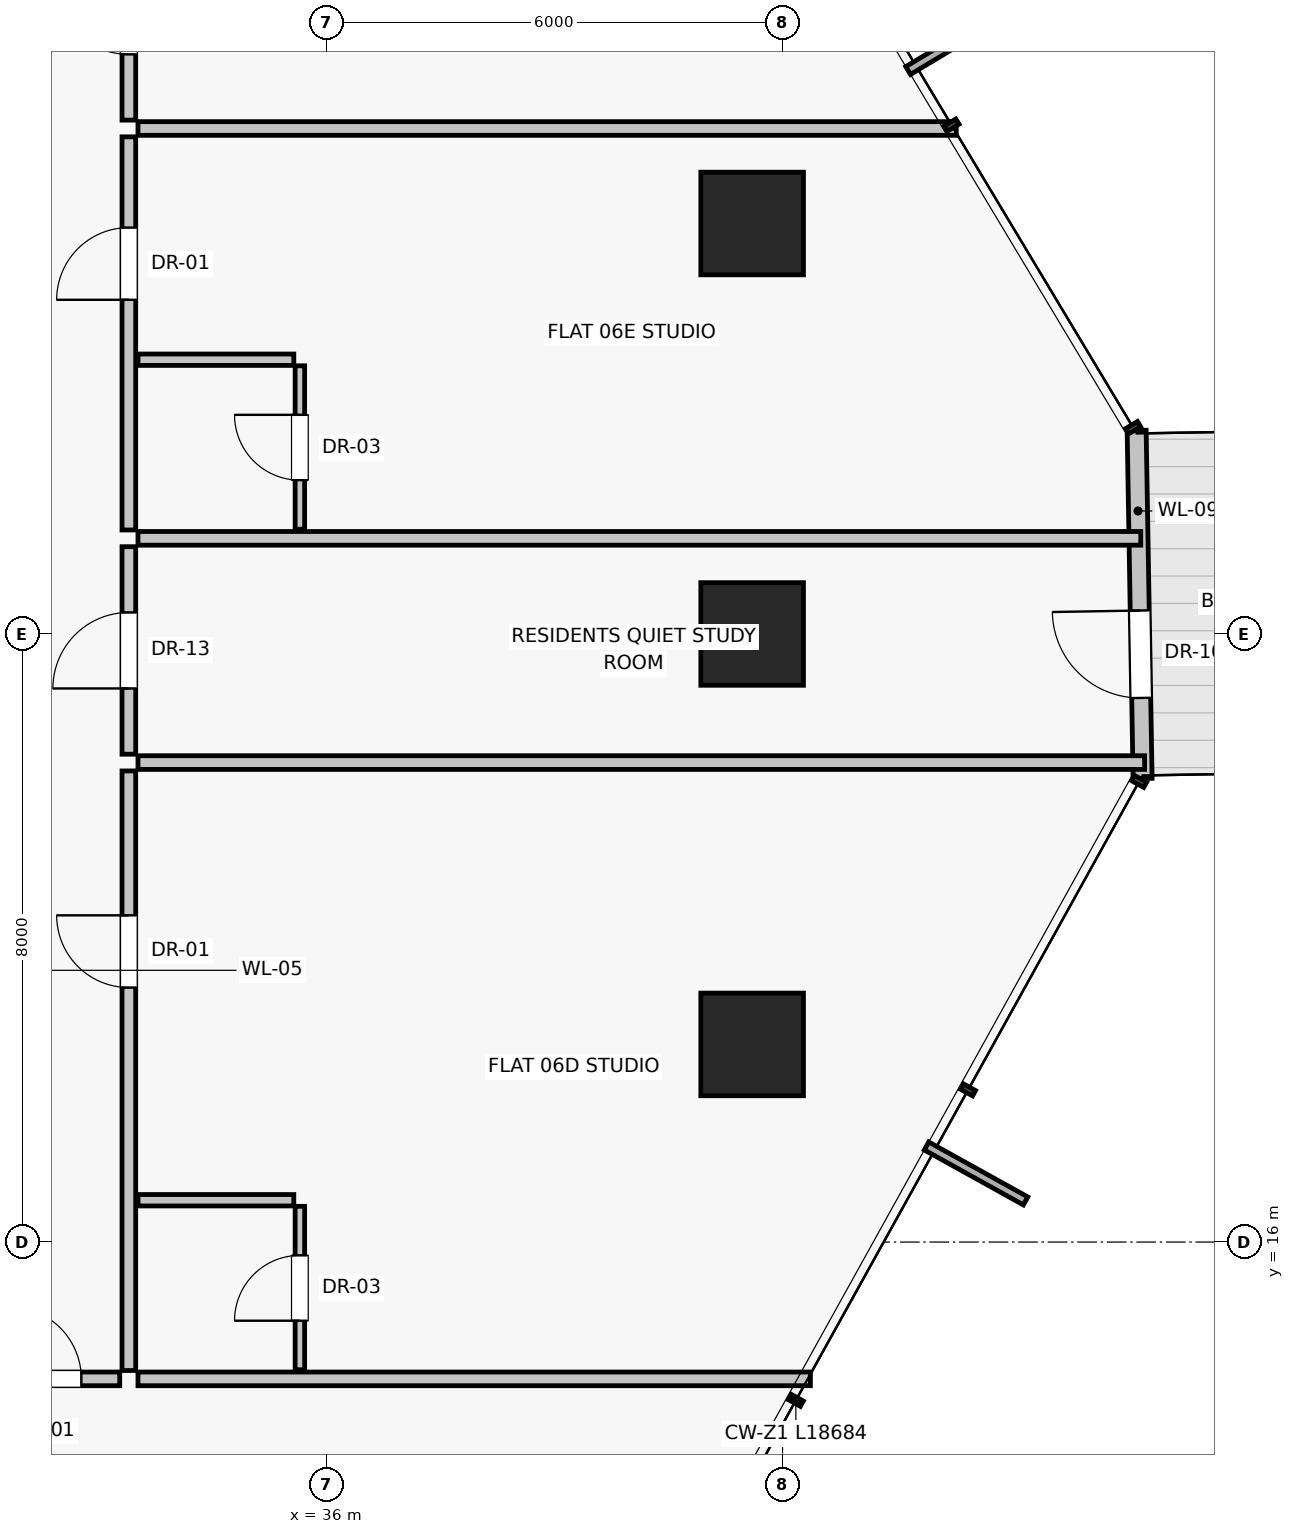
"""IFC4 building model, lengths in metres.
Left out: names, types, materials, properties, quantities, classifications, styles, units other than length and angle.
Written with IfcOpenShell. Run it as: python <this file> out.ifc"""

import sys

from ifc_helpers import new_model, si_unit, direction, frame, frame_2d, origin, origin_2d, place, context, subcontext, project, spatial, rectangle, extrude, source, transform, mapped, element, fill, save


model = new_model("IFC4")
c1 = context("Model", 3, precision=1e-05, world=origin(), true_north=direction((0.0, 1.0)))
c2 = subcontext(c1, "Body", "Model", "MODEL_VIEW")
j1 = project(units=[si_unit("LENGTHUNIT", "METRE"), si_unit("PLANEANGLEUNIT", "RADIAN")], contexts=[c1])
p1 = place(None, origin())
s1 = spatial("IfcSite", under=j1, at=p1, CompositionType="ELEMENT")
p2 = place(p1, origin())
s2 = spatial("IfcBuilding", under=s1, at=p2, CompositionType="ELEMENT")
p3 = place(p2, frame((0.0, 0.0, 27.3)))
s3 = spatial("IfcBuildingStorey", under=s2, at=p3, CompositionType="ELEMENT", Elevation=27.3)
for number, where, z_axis, x_axis in (
    (1, (41.6, 18.6, 0.0), (0.0, 0.0, 1.0), (1.0, 0.0, 0.0)),
    (2, (41.6, 24.0, 0.0), (0.0, 0.0, 1.0), (1.0, 0.0, 0.0)),
    (3, (41.6, 29.4, 0.0), (0.0, 0.0, 1.0), (1.0, 0.0, 0.0)),
):
    element("IfcColumn", number, at=place(p3, frame(where, z_axis=z_axis, x_axis=x_axis)), inside=s3, PredefinedType="COLUMN", context=c2, shape_type="SweptSolid", body=[
        extrude(rectangle(XDim=1.35, YDim=1.35, at=origin_2d()), origin(), (0.0, 0.0, 1.0), 3.25),
    ])
p4 = place(p3, frame((46.737, 22.099, 0.0), z_axis=(0.0, 0.0, 1.0), x_axis=(-0.017111105389, 0.999853594319, 0.0)))
e4 = element("IfcWall", 4, at=p4, inside=s3, PredefinedType="SOLIDWALL", context=c2, shape_type="SweptSolid", body=[
    extrude(rectangle(XDim=4.58, YDim=0.25, at=frame_2d((2.29, 0.0))), origin(), (0.0, 0.0, 1.0), 3.0),
])
p5 = place(p4, frame((1.06, 0.0, 0.0)))
e5 = element("IfcOpeningElement", 5, at=p5, cuts=e4, PredefinedType="OPENING", context=c2, shape_type="SweptSolid", body=[
    extrude(rectangle(XDim=1.15, YDim=2.25, at=frame_2d((0.575, 1.125))), frame((0.0, 0.135, 0.0), z_axis=(0.0, -1.0, 0.0), x_axis=(1.0, 0.0, 0.0)), (0.0, 0.0, 1.0), 0.27),
])
p6 = place(p3, frame((33.52, 14.2, 0.0), z_axis=(0.0, 0.0, 1.0), x_axis=(1.0, 0.0, 0.0)))
e6 = element("IfcWall", 6, at=p6, inside=s3, PredefinedType="PARTITIONING", context=c2, shape_type="SweptSolid", body=[
    extrude(rectangle(XDim=8.846, YDim=0.18, at=frame_2d((4.423, 0.0))), origin(), (0.0, 0.0, 1.0), 3.0),
])
p7 = place(p3, frame((33.4, 22.418, 0.0), z_axis=(0.0, 0.0, 1.0), x_axis=(0.0, 1.0, 0.0)))
e7 = element("IfcWall", 7, at=p7, inside=s3, PredefinedType="PARTITIONING", context=c2, shape_type="SweptSolid", body=[
    extrude(rectangle(XDim=2.73, YDim=0.18, at=frame_2d((1.365, 0.0))), origin(), (0.0, 0.0, 1.0), 3.0),
])
p8 = place(p7, frame((0.865, 0.0, 0.0)))
e8 = element("IfcOpeningElement", 8, at=p8, cuts=e7, PredefinedType="OPENING", context=c2, shape_type="SweptSolid", body=[
    extrude(rectangle(XDim=1.0, YDim=2.01, at=frame_2d((0.5, 1.005))), frame((0.0, 0.1, 0.0), z_axis=(0.0, -1.0, 0.0), x_axis=(1.0, 0.0, 0.0)), (0.0, 0.0, 1.0), 0.2),
])
p9 = place(p3, frame((33.52, 22.308, 0.0), z_axis=(0.0, 0.0, 1.0), x_axis=(1.0, 0.0, 0.0)))
e9 = element("IfcWall", 9, at=p9, inside=s3, PredefinedType="PARTITIONING", context=c2, shape_type="SweptSolid", body=[
    extrude(rectangle(XDim=13.243, YDim=0.18, at=frame_2d((6.622, 0.0))), origin(), (0.0, 0.0, 1.0), 3.0),
])
p10 = place(p3, frame((33.4, 14.31, 0.0), z_axis=(0.0, 0.0, 1.0), x_axis=(0.0, 1.0, 0.0)))
e10 = element("IfcWall", 10, at=p10, inside=s3, PredefinedType="PARTITIONING", context=c2, shape_type="SweptSolid", body=[
    extrude(rectangle(XDim=7.888, YDim=0.18, at=frame_2d((3.944, 0.0))), origin(), (0.0, 0.0, 1.0), 3.0),
])
p11 = place(p10, frame((5.038, 0.0, 0.0)))
e11 = element("IfcOpeningElement", 11, at=p11, cuts=e10, PredefinedType="OPENING", context=c2, shape_type="SweptSolid", body=[
    extrude(rectangle(XDim=0.95, YDim=2.02, at=frame_2d((0.475, 1.01))), frame((0.0, 0.1, 0.0), z_axis=(0.0, -1.0, 0.0), x_axis=(1.0, 0.0, 0.0)), (0.0, 0.0, 1.0), 0.2),
])
p12 = place(p3, frame((33.52, 16.55, 0.0), z_axis=(0.0, 0.0, 1.0), x_axis=(1.0, 0.0, 0.0)))
e12 = element("IfcWall", 12, at=p12, inside=s3, PredefinedType="PARTITIONING", context=c2, shape_type="SweptSolid", body=[
    extrude(rectangle(XDim=2.05, YDim=0.15, at=frame_2d((1.025, 0.0))), origin(), (0.0, 0.0, 1.0), 3.0),
])
p13 = place(p3, frame((35.65, 14.32, 0.0), z_axis=(0.0, 0.0, 1.0), x_axis=(0.0, 1.0, 0.0)))
e13 = element("IfcWall", 13, at=p13, inside=s3, PredefinedType="PARTITIONING", context=c2, shape_type="SweptSolid", body=[
    extrude(rectangle(XDim=2.15, YDim=0.125, at=frame_2d((1.075, 0.0))), origin(), (0.0, 0.0, 1.0), 3.0),
])
p14 = place(p13, frame((0.645, 0.0, 0.0)))
e14 = element("IfcOpeningElement", 14, at=p14, cuts=e13, PredefinedType="OPENING", context=c2, shape_type="SweptSolid", body=[
    extrude(rectangle(XDim=0.86, YDim=2.01, at=frame_2d((0.43, 1.005))), frame((0.0, 0.073, 0.0), z_axis=(0.0, -1.0, 0.0), x_axis=(1.0, 0.0, 0.0)), (0.0, 0.0, 1.0), 0.145),
])
p15 = place(p3, frame((33.52, 25.258, 0.0), z_axis=(0.0, 0.0, 1.0), x_axis=(1.0, 0.0, 0.0)))
e15 = element("IfcWall", 15, at=p15, inside=s3, PredefinedType="PARTITIONING", context=c2, shape_type="SweptSolid", body=[
    extrude(rectangle(XDim=13.193, YDim=0.18, at=frame_2d((6.596, 0.0))), origin(), (0.0, 0.0, 1.0), 3.0),
])
p16 = place(p3, frame((33.4, 30.76, 0.0), z_axis=(0.0, 0.0, 1.0), x_axis=(0.0, 1.0, 0.0)))
e16 = element("IfcWall", 16, at=p16, inside=s3, PredefinedType="PARTITIONING", context=c2, shape_type="SweptSolid", body=[
    extrude(rectangle(XDim=2.73, YDim=0.18, at=frame_2d((1.365, 0.0))), origin(), (0.0, 0.0, 1.0), 3.0),
])
p17 = place(p16, frame((0.865, 0.0, 0.0)))
e17 = element("IfcOpeningElement", 17, at=p17, cuts=e16, PredefinedType="OPENING", context=c2, shape_type="SweptSolid", body=[
    extrude(rectangle(XDim=1.0, YDim=2.01, at=frame_2d((0.5, 1.005))), frame((0.0, 0.1, 0.0), z_axis=(0.0, -1.0, 0.0), x_axis=(1.0, 0.0, 0.0)), (0.0, 0.0, 1.0), 0.2),
])
p18 = place(p3, frame((33.52, 30.65, 0.0), z_axis=(0.0, 0.0, 1.0), x_axis=(1.0, 0.0, 0.0)))
e18 = element("IfcWall", 18, at=p18, inside=s3, PredefinedType="PARTITIONING", context=c2, shape_type="SweptSolid", body=[
    extrude(rectangle(XDim=10.765, YDim=0.18, at=frame_2d((5.383, 0.0))), origin(), (0.0, 0.0, 1.0), 2.299),
])
p19 = place(p3, frame((33.4, 25.368, 0.0), z_axis=(0.0, 0.0, 1.0), x_axis=(0.0, 1.0, 0.0)))
e19 = element("IfcWall", 19, at=p19, inside=s3, PredefinedType="PARTITIONING", context=c2, shape_type="SweptSolid", body=[
    extrude(rectangle(XDim=5.172, YDim=0.18, at=frame_2d((2.586, 0.0))), origin(), (0.0, 0.0, 1.0), 3.0),
])
p20 = place(p19, frame((3.028, 0.0, 0.0)))
e20 = element("IfcOpeningElement", 20, at=p20, cuts=e19, PredefinedType="OPENING", context=c2, shape_type="SweptSolid", body=[
    extrude(rectangle(XDim=0.95, YDim=2.02, at=frame_2d((0.475, 1.01))), frame((0.0, 0.1, 0.0), z_axis=(0.0, -1.0, 0.0), x_axis=(1.0, 0.0, 0.0)), (0.0, 0.0, 1.0), 0.2),
])
p21 = place(p3, frame((33.52, 27.608, 0.0), z_axis=(0.0, 0.0, 1.0), x_axis=(1.0, 0.0, 0.0)))
e21 = element("IfcWall", 21, at=p21, inside=s3, PredefinedType="PARTITIONING", context=c2, shape_type="SweptSolid", body=[
    extrude(rectangle(XDim=2.05, YDim=0.15, at=frame_2d((1.025, 0.0))), origin(), (0.0, 0.0, 1.0), 3.0),
])
p22 = place(p3, frame((35.65, 25.378, 0.0), z_axis=(0.0, 0.0, 1.0), x_axis=(0.0, 1.0, 0.0)))
e22 = element("IfcWall", 22, at=p22, inside=s3, PredefinedType="PARTITIONING", context=c2, shape_type="SweptSolid", body=[
    extrude(rectangle(XDim=2.15, YDim=0.125, at=frame_2d((1.075, 0.0))), origin(), (0.0, 0.0, 1.0), 3.0),
])
p23 = place(p22, frame((0.645, 0.0, 0.0)))
e23 = element("IfcOpeningElement", 23, at=p23, cuts=e22, PredefinedType="OPENING", context=c2, shape_type="SweptSolid", body=[
    extrude(rectangle(XDim=0.86, YDim=2.01, at=frame_2d((0.43, 1.005))), frame((0.0, 0.073, 0.0), z_axis=(0.0, -1.0, 0.0), x_axis=(1.0, 0.0, 0.0)), (0.0, 0.0, 1.0), 0.145),
])
p24 = place(p3, frame((31.32, 14.2, 0.0), z_axis=(0.0, 0.0, 1.0), x_axis=(1.0, 0.0, 0.0)))
e24 = element("IfcWall", 24, at=p24, inside=s3, PredefinedType="PARTITIONING", context=c2, shape_type="SweptSolid", body=[
    extrude(rectangle(XDim=1.96, YDim=0.18, at=frame_2d((0.98, 0.0))), origin(), (0.0, 0.0, 1.0), 3.0),
])
p25 = place(p24, frame((0.505, 0.0, 0.0)))
e25 = element("IfcOpeningElement", 25, at=p25, cuts=e24, PredefinedType="OPENING", context=c2, shape_type="SweptSolid", body=[
    extrude(rectangle(XDim=0.95, YDim=2.02, at=frame_2d((0.475, 1.01))), frame((0.0, 0.1, 0.0), z_axis=(0.0, -1.0, 0.0), x_axis=(1.0, 0.0, 0.0)), (0.0, 0.0, 1.0), 0.2),
])
m1 = source(origin(), c2, "Body", "SweptSolid", [
    extrude(rectangle(XDim=1.15, YDim=2.25, at=frame_2d((0.575, 1.125))), frame((0.0, 0.025, 0.0), z_axis=(0.0, -1.0, 0.0), x_axis=(1.0, 0.0, 0.0)), (0.0, 0.0, 1.0), 0.05),
])
p26 = place(p5, frame((1.15, 0.0, 0.0), z_axis=(0.0, 0.0, 1.0), x_axis=(-1.0, 0.0, 0.0)))
e26 = element("IfcDoor", 26, at=p26, inside=s3, OperationType="SINGLE_SWING_RIGHT", PredefinedType="DOOR", context=c2, shape_type="MappedRepresentation", body=[
    mapped(m1, transform((0.0, 0.0, 0.0), scale=1.0)),
])
fill(e5, e26)
m2 = source(origin(), c2, "Body", "SweptSolid", [
    extrude(rectangle(XDim=1.0, YDim=2.01, at=frame_2d((0.5, 1.005))), frame((0.0, 0.025, 0.0), z_axis=(0.0, -1.0, 0.0), x_axis=(1.0, 0.0, 0.0)), (0.0, 0.0, 1.0), 0.05),
])
p27 = place(p8, origin())
e27 = element("IfcDoor", 27, at=p27, inside=s3, OperationType="SINGLE_SWING_LEFT", PredefinedType="DOOR", context=c2, shape_type="MappedRepresentation", body=[
    mapped(m2, transform((0.0, 0.0, 0.0), scale=1.0)),
])
fill(e8, e27)
m3 = source(origin(), c2, "Body", "SweptSolid", [
    extrude(rectangle(XDim=0.95, YDim=2.02, at=frame_2d((0.475, 1.01))), frame((0.0, 0.025, 0.0), z_axis=(0.0, -1.0, 0.0), x_axis=(1.0, 0.0, 0.0)), (0.0, 0.0, 1.0), 0.05),
])
p28 = place(p11, origin())
e28 = element("IfcDoor", 28, at=p28, inside=s3, OperationType="SINGLE_SWING_RIGHT", PredefinedType="DOOR", context=c2, shape_type="MappedRepresentation", body=[
    mapped(m3, transform((0.0, 0.0, 0.0), scale=1.0)),
])
fill(e11, e28)
m4 = source(origin(), c2, "Body", "SweptSolid", [
    extrude(rectangle(XDim=0.86, YDim=2.01, at=frame_2d((0.43, 1.005))), frame((0.0, 0.025, 0.0), z_axis=(0.0, -1.0, 0.0), x_axis=(1.0, 0.0, 0.0)), (0.0, 0.0, 1.0), 0.05),
])
p29 = place(p14, origin())
e29 = element("IfcDoor", 29, at=p29, inside=s3, OperationType="SINGLE_SWING_LEFT", PredefinedType="DOOR", context=c2, shape_type="MappedRepresentation", body=[
    mapped(m4, transform((0.0, 0.0, 0.0), scale=1.0)),
])
fill(e14, e29)
p30 = place(p17, origin())
e30 = element("IfcDoor", 30, at=p30, inside=s3, OperationType="SINGLE_SWING_RIGHT", PredefinedType="DOOR", context=c2, shape_type="MappedRepresentation", body=[
    mapped(m2, transform((0.0, 0.0, 0.0), scale=1.0)),
])
fill(e17, e30)
p31 = place(p20, origin())
e31 = element("IfcDoor", 31, at=p31, inside=s3, OperationType="SINGLE_SWING_LEFT", PredefinedType="DOOR", context=c2, shape_type="MappedRepresentation", body=[
    mapped(m3, transform((0.0, 0.0, 0.0), scale=1.0)),
])
fill(e20, e31)
p32 = place(p23, origin())
e32 = element("IfcDoor", 32, at=p32, inside=s3, OperationType="SINGLE_SWING_RIGHT", PredefinedType="DOOR", context=c2, shape_type="MappedRepresentation", body=[
    mapped(m4, transform((0.0, 0.0, 0.0), scale=1.0)),
])
fill(e23, e32)
p33 = place(p25, origin())
e33 = element("IfcDoor", 33, at=p33, inside=s3, OperationType="SINGLE_SWING_LEFT", PredefinedType="DOOR", context=c2, shape_type="MappedRepresentation", body=[
    mapped(m3, transform((0.0, 0.0, 0.0), scale=1.0)),
])
fill(e25, e33)
save(model, sys.argv[1])
